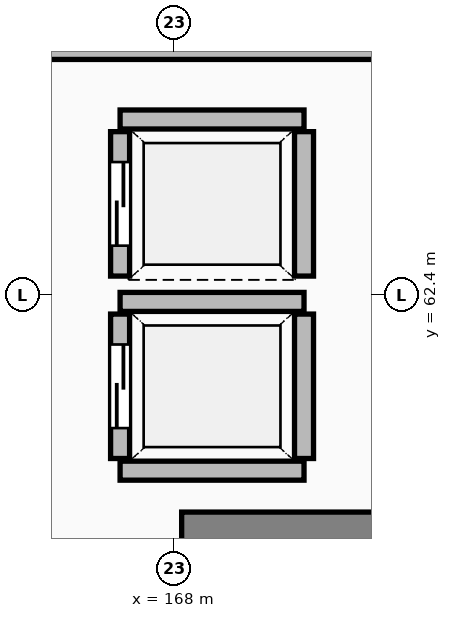
"""IFC4 building model, lengths in metres.
Left out: names, types, materials, properties, quantities, classifications, styles, units other than length and angle.
Written with IfcOpenShell. Run it as: python <this file> out.ifc"""

import sys

from ifc_helpers import new_model, si_unit, direction, frame, frame_2d, origin, place, context, subcontext, project, spatial, rectangle, extrude, element, fill, save


model = new_model("IFC4")
c1 = context("Model", 3, precision=1e-05, world=origin(), true_north=direction((0.0, 1.0)))
c2 = subcontext(c1, "Body", "Model", "MODEL_VIEW")
j1 = project(units=[si_unit("LENGTHUNIT", "METRE"), si_unit("PLANEANGLEUNIT", "RADIAN")], contexts=[c1])
p1 = place(None, origin())
s1 = spatial("IfcSite", under=j1, at=p1, CompositionType="ELEMENT")
p2 = place(p1, origin())
s2 = spatial("IfcBuilding", under=s1, at=p2, CompositionType="ELEMENT")
p3 = place(p2, frame((0.0, 0.0, -4.2)))
s3 = spatial("IfcBuildingStorey", under=s2, at=p3, CompositionType="ELEMENT", Elevation=-4.2)
p4 = place(p3, frame((168.1, 59.32, 0.0), z_axis=(0.0, 0.0, 1.0), x_axis=(1.0, 0.0, 0.0)))
e1 = element("IfcWall", 1, at=p4, inside=s3, PredefinedType="SHEAR", context=c2, shape_type="SweptSolid", body=[
    extrude(rectangle(XDim=3.67, YDim=0.45, at=frame_2d((1.835, 0.0))), origin(), (0.0, 0.0, 1.0), 3.78),
])
for number, where, z_axis, x_axis in (
    (2, (167.29, 60.09, 0.0), (0.0, 0.0, 1.0), (1.0, 0.0, 0.0)),
    (3, (167.29, 62.31, 0.0), (0.0, 0.0, 1.0), (1.0, 0.0, 0.0)),
):
    element("IfcWall", number, at=place(p3, frame(where, z_axis=z_axis, x_axis=x_axis)), inside=s3, PredefinedType="SOLIDWALL", context=c2, shape_type="SweptSolid", body=[
        extrude(rectangle(XDim=2.42, YDim=0.25, at=frame_2d((1.21, 0.0))), origin(), (0.0, 0.0, 1.0), 3.78),
    ])
p5 = place(p3, frame((167.29, 60.25, 0.0), z_axis=(0.0, 0.0, 1.0), x_axis=(0.0, 1.0, 0.0)))
e4 = element("IfcWall", 4, at=p5, inside=s3, PredefinedType="SOLIDWALL", context=c2, shape_type="SweptSolid", body=[
    extrude(rectangle(XDim=1.9, YDim=0.25, at=frame_2d((0.95, 0.0))), origin(), (0.0, 0.0, 1.0), 3.78),
])
p6 = place(p5, frame((0.4, 0.0, 0.0)))
e5 = element("IfcOpeningElement", 5, at=p6, cuts=e4, PredefinedType="OPENING", context=c2, shape_type="SweptSolid", body=[
    extrude(rectangle(XDim=1.1, YDim=2.2, at=frame_2d((0.55, 1.1))), frame((0.0, 0.137, 0.0), z_axis=(0.0, -1.0, 0.0), x_axis=(1.0, 0.0, 0.0)), (0.0, 0.0, 1.0), 0.274),
])
p7 = place(p3, frame((169.71, 60.25, 0.0), z_axis=(0.0, 0.0, 1.0), x_axis=(0.0, 1.0, 0.0)))
e6 = element("IfcWall", 6, at=p7, inside=s3, PredefinedType="SOLIDWALL", context=c2, shape_type="SweptSolid", body=[
    extrude(rectangle(XDim=1.9, YDim=0.25, at=frame_2d((0.95, 0.0))), origin(), (0.0, 0.0, 1.0), 3.78),
])
p8 = place(p3, frame((167.29, 64.71, 0.0), z_axis=(0.0, 0.0, 1.0), x_axis=(1.0, 0.0, 0.0)))
e7 = element("IfcWall", 7, at=p8, inside=s3, PredefinedType="SOLIDWALL", context=c2, shape_type="SweptSolid", body=[
    extrude(rectangle(XDim=2.42, YDim=0.25, at=frame_2d((1.21, 0.0))), origin(), (0.0, 0.0, 1.0), 3.78),
])
p9 = place(p3, frame((167.29, 62.65, 0.0), z_axis=(0.0, 0.0, 1.0), x_axis=(0.0, 1.0, 0.0)))
e8 = element("IfcWall", 8, at=p9, inside=s3, PredefinedType="SOLIDWALL", context=c2, shape_type="SweptSolid", body=[
    extrude(rectangle(XDim=1.9, YDim=0.25, at=frame_2d((0.95, 0.0))), origin(), (0.0, 0.0, 1.0), 3.78),
])
p10 = place(p9, frame((0.4, 0.0, 0.0)))
e9 = element("IfcOpeningElement", 9, at=p10, cuts=e8, PredefinedType="OPENING", context=c2, shape_type="SweptSolid", body=[
    extrude(rectangle(XDim=1.1, YDim=2.2, at=frame_2d((0.55, 1.1))), frame((0.0, 0.137, 0.0), z_axis=(0.0, -1.0, 0.0), x_axis=(1.0, 0.0, 0.0)), (0.0, 0.0, 1.0), 0.274),
])
p11 = place(p3, frame((169.71, 62.65, 0.0), z_axis=(0.0, 0.0, 1.0), x_axis=(0.0, 1.0, 0.0)))
e10 = element("IfcWall", 10, at=p11, inside=s3, PredefinedType="SOLIDWALL", context=c2, shape_type="SweptSolid", body=[
    extrude(rectangle(XDim=1.9, YDim=0.25, at=frame_2d((0.95, 0.0))), origin(), (0.0, 0.0, 1.0), 3.78),
])
p12 = place(p3, frame((166.1, 65.6, 0.0), z_axis=(0.0, 0.0, 1.0), x_axis=(1.0, 0.0, 0.0)))
e11 = element("IfcWall", 11, at=p12, inside=s3, PredefinedType="PARTITIONING", context=c2, shape_type="SweptSolid", body=[
    extrude(rectangle(XDim=13.0, YDim=0.2, at=frame_2d((6.5, 0.0))), origin(), (0.0, 0.0, 1.0), 2.932),
])
p13 = place(p6, origin())
e12 = element("IfcDoor", 12, at=p13, inside=s3, OperationType="SLIDING_TO_LEFT", PredefinedType="DOOR", context=c2, shape_type="SweptSolid", body=[
    extrude(rectangle(XDim=1.1, YDim=2.2, at=frame_2d((0.55, 1.1))), frame((0.0, 0.025, 0.0), z_axis=(0.0, -1.0, 0.0), x_axis=(1.0, 0.0, 0.0)), (0.0, 0.0, 1.0), 0.05),
])
fill(e5, e12)
p14 = place(p10, origin())
e13 = element("IfcDoor", 13, at=p14, inside=s3, OperationType="SLIDING_TO_LEFT", PredefinedType="DOOR", context=c2, shape_type="SweptSolid", body=[
    extrude(rectangle(XDim=1.1, YDim=2.2, at=frame_2d((0.55, 1.1))), frame((0.0, 0.025, 0.0), z_axis=(0.0, -1.0, 0.0), x_axis=(1.0, 0.0, 0.0)), (0.0, 0.0, 1.0), 0.05),
])
fill(e9, e13)
save(model, sys.argv[1])
